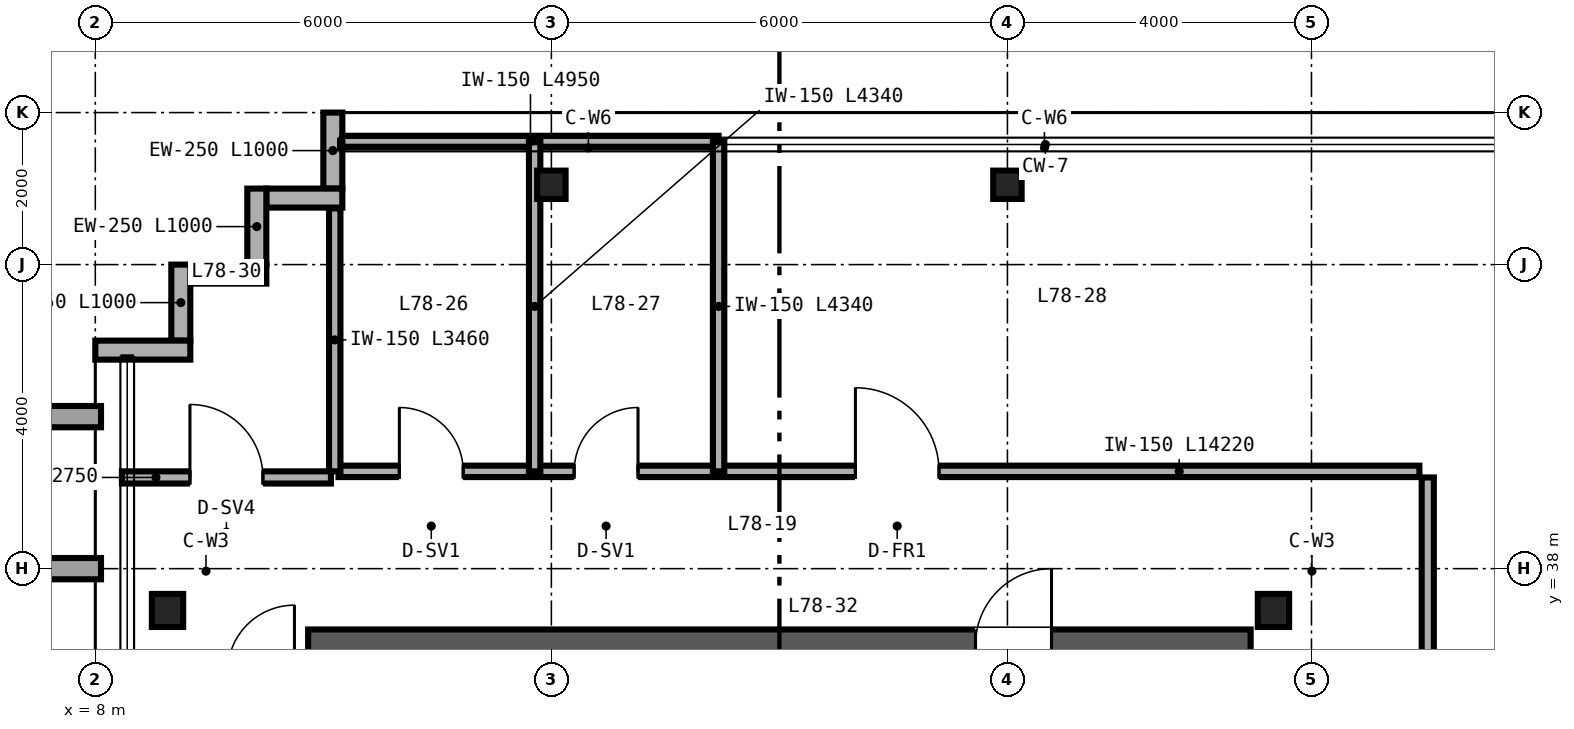
"""IFC4 building model, lengths in metres.
Left out: names, types, materials, properties, quantities, classifications, styles, units other than length and angle.
Written with IfcOpenShell. Run it as: python <this file> out.ifc"""

import sys

from ifc_helpers import new_model, si_unit, direction, frame, frame_2d, origin, origin_2d, place, context, subcontext, project, spatial, rectangle, i_section, extrude, source, transform, mapped, element, fill, save


model = new_model("IFC4")
c1 = context("Model", 3, precision=1e-05, world=origin(), true_north=direction((0.0, 1.0)))
c2 = subcontext(c1, "Body", "Model", "MODEL_VIEW")
j1 = project(units=[si_unit("LENGTHUNIT", "METRE"), si_unit("PLANEANGLEUNIT", "RADIAN")], contexts=[c1])
p1 = place(None, origin())
s1 = spatial("IfcSite", under=j1, at=p1, CompositionType="ELEMENT")
p2 = place(p1, origin())
s2 = spatial("IfcBuilding", under=s1, at=p2, CompositionType="ELEMENT")
p3 = place(p2, frame((0.0, 0.0, 305.4)))
s3 = spatial("IfcBuildingStorey", under=s2, at=p3, CompositionType="ELEMENT", Elevation=305.4)
p4 = place(p3, frame((10.8, 37.0, 0.0), z_axis=(0.0, 0.0, 1.0), x_axis=(1.0, 0.0, 0.0)))
e1 = element("IfcWall", 1, at=p4, inside=s3, PredefinedType="SHEAR", context=c2, shape_type="SweptSolid", body=[
    extrude(rectangle(XDim=12.4, YDim=0.4, at=frame_2d((6.2, 0.0))), origin(), (0.0, 0.0, 1.0), 3.88),
])
p5 = place(p4, frame((8.78, 0.0, 0.0)))
e2 = element("IfcOpeningElement", 2, at=p5, cuts=e1, PredefinedType="OPENING", context=c2, shape_type="SweptSolid", body=[
    extrude(rectangle(XDim=1.0, YDim=2.15, at=frame_2d((0.5, 1.075))), frame((0.0, 0.21, 0.0), z_axis=(0.0, -1.0, 0.0), x_axis=(1.0, 0.0, 0.0)), (0.0, 0.0, 1.0), 0.42),
])
m1 = source(origin(), c2, "Body", "SweptSolid", [
    extrude(i_section(OverallWidth=0.412, OverallDepth=0.435, WebThickness=0.036, FlangeThickness=0.057, FilletRadius=0.025, at=origin_2d()), origin(), (0.0, 0.0, 1.0), 3.88),
])
for number, where, z_axis, x_axis in (
    (3, (8.95, 37.45, 0.0), (0.0, 0.0, 1.0), (1.0, 0.0, 0.0)),
    (4, (23.5, 37.45, 0.0), (0.0, 0.0, 1.0), (1.0, 0.0, 0.0)),
):
    element("IfcColumn", number, at=place(p3, frame(where, z_axis=z_axis, x_axis=x_axis)), inside=s3, PredefinedType="COLUMN", context=c2, shape_type="MappedRepresentation", body=[
        mapped(m1, transform((0.0, 0.0, 0.0), scale=1.0)),
    ])
m2 = source(origin(), c2, "Body", "SweptSolid", [
    extrude(i_section(OverallWidth=0.374, OverallDepth=0.373, WebThickness=0.016, FlangeThickness=0.026, FilletRadius=0.025, at=origin_2d()), origin(), (0.0, 0.0, 1.0), 3.88),
])
for number, where, z_axis, x_axis in (
    (5, (14.0, 43.05, 0.0), (0.0, 0.0, 1.0), (1.0, 0.0, 0.0)),
    (6, (20.0, 43.05, 0.0), (0.0, 0.0, 1.0), (1.0, 0.0, 0.0)),
):
    element("IfcColumn", number, at=place(p3, frame(where, z_axis=z_axis, x_axis=x_axis)), inside=s3, PredefinedType="COLUMN", context=c2, shape_type="MappedRepresentation", body=[
        mapped(m2, transform((0.0, 0.0, 0.0), scale=1.0)),
    ])
for number, where, z_axis, x_axis in (
    (7, (11.125, 44.0, 0.0), (0.0, 0.0, 1.0), (0.0, -1.0, 0.0)),
    (8, (11.25, 42.875, 0.0), (0.0, 0.0, 1.0), (-1.0, 0.0, 0.0)),
    (9, (10.125, 43.0, 0.0), (0.0, 0.0, 1.0), (0.0, -1.0, 0.0)),
    (10, (10.25, 41.875, 0.0), (0.0, 0.0, 1.0), (-1.0, 0.0, 0.0)),
    (11, (9.125, 42.0, 0.0), (0.0, 0.0, 1.0), (0.0, -1.0, 0.0)),
):
    element("IfcWall", number, at=place(p3, frame(where, z_axis=z_axis, x_axis=x_axis)), inside=s3, PredefinedType="SOLIDWALL", context=c2, shape_type="SweptSolid", body=[
        extrude(rectangle(XDim=1.0, YDim=0.25, at=frame_2d((0.5, 0.0))), origin(), (0.0, 0.0, 1.0), 3.88),
    ])
p6 = place(p3, frame((9.25, 40.875, 0.0), z_axis=(0.0, 0.0, 1.0), x_axis=(-1.0, 0.0, 0.0)))
e12 = element("IfcWall", 12, at=p6, inside=s3, PredefinedType="SOLIDWALL", context=c2, shape_type="SweptSolid", body=[
    extrude(rectangle(XDim=1.25, YDim=0.25, at=frame_2d((0.625, 0.0))), origin(), (0.0, 0.0, 1.0), 3.88),
])
p7 = place(p3, frame((25.53, 12.8, 0.0), z_axis=(0.0, 0.0, 1.0), x_axis=(0.0, 1.0, 0.0)))
e13 = element("IfcWall", 13, at=p7, inside=s3, PredefinedType="PARTITIONING", context=c2, shape_type="SweptSolid", body=[
    extrude(rectangle(XDim=26.4, YDim=0.16, at=frame_2d((13.2, 0.0))), origin(), (0.0, 0.0, 1.0), 3.024),
])
p8 = place(p7, frame((5.5, 0.0, 0.0)))
e14 = element("IfcOpeningElement", 14, at=p8, cuts=e13, PredefinedType="OPENING", context=c2, shape_type="SweptSolid", body=[
    extrude(rectangle(XDim=1.6, YDim=2.3, at=frame_2d((0.8, 1.15))), frame((0.0, 0.09, 0.0), z_axis=(0.0, -1.0, 0.0), x_axis=(1.0, 0.0, 0.0)), (0.0, 0.0, 1.0), 0.18),
])
p9 = place(p7, frame((18.5, 0.0, 0.0)))
e15 = element("IfcOpeningElement", 15, at=p9, cuts=e13, PredefinedType="OPENING", context=c2, shape_type="SweptSolid", body=[
    extrude(rectangle(XDim=1.6, YDim=2.3, at=frame_2d((0.8, 1.15))), frame((0.0, 0.09, 0.0), z_axis=(0.0, -1.0, 0.0), x_axis=(1.0, 0.0, 0.0)), (0.0, 0.0, 1.0), 0.18),
])
p10 = place(p3, frame((11.2, 39.28, 0.0), z_axis=(0.0, 0.0, 1.0), x_axis=(1.0, 0.0, 0.0)))
e16 = element("IfcWall", 16, at=p10, inside=s3, PredefinedType="PARTITIONING", context=c2, shape_type="SweptSolid", body=[
    extrude(rectangle(XDim=14.22, YDim=0.15, at=frame_2d((7.11, 0.0))), origin(), (0.0, 0.0, 1.0), 3.88),
])
p11 = place(p10, frame((0.8, 0.0, 0.0)))
e17 = element("IfcOpeningElement", 17, at=p11, cuts=e16, PredefinedType="OPENING", context=c2, shape_type="SweptSolid", body=[
    extrude(rectangle(XDim=0.84, YDim=2.1, at=frame_2d((0.42, 1.05))), frame((0.0, 0.085, 0.0), z_axis=(0.0, -1.0, 0.0), x_axis=(1.0, 0.0, 0.0)), (0.0, 0.0, 1.0), 0.17),
])
p12 = place(p10, frame((3.1, 0.0, 0.0)))
e18 = element("IfcOpeningElement", 18, at=p12, cuts=e16, PredefinedType="OPENING", context=c2, shape_type="SweptSolid", body=[
    extrude(rectangle(XDim=0.84, YDim=2.1, at=frame_2d((0.42, 1.05))), frame((0.0, 0.085, 0.0), z_axis=(0.0, -1.0, 0.0), x_axis=(1.0, 0.0, 0.0)), (0.0, 0.0, 1.0), 0.17),
])
p13 = place(p10, frame((6.8, 0.0, 0.0)))
e19 = element("IfcOpeningElement", 19, at=p13, cuts=e16, PredefinedType="OPENING", context=c2, shape_type="SweptSolid", body=[
    extrude(rectangle(XDim=1.1, YDim=2.15, at=frame_2d((0.55, 1.075))), frame((0.0, 0.085, 0.0), z_axis=(0.0, -1.0, 0.0), x_axis=(1.0, 0.0, 0.0)), (0.0, 0.0, 1.0), 0.17),
])
p14 = place(p3, frame((11.15, 39.28, 0.0), z_axis=(0.0, 0.0, 1.0), x_axis=(0.0, 1.0, 0.0)))
e20 = element("IfcWall", 20, at=p14, inside=s3, PredefinedType="PARTITIONING", context=c2, shape_type="SweptSolid", body=[
    extrude(rectangle(XDim=3.46, YDim=0.15, at=frame_2d((1.73, 0.0))), origin(), (0.0, 0.0, 1.0), 3.88),
])
p15 = place(p3, frame((11.25, 43.62, 0.0), z_axis=(0.0, 0.0, 1.0), x_axis=(1.0, 0.0, 0.0)))
e21 = element("IfcWall", 21, at=p15, inside=s3, PredefinedType="PARTITIONING", context=c2, shape_type="SweptSolid", body=[
    extrude(rectangle(XDim=4.95, YDim=0.15, at=frame_2d((2.475, 0.0))), origin(), (0.0, 0.0, 1.0), 3.88),
])
for number, where, z_axis, x_axis in (
    (22, (13.78, 39.28, 0.0), (0.0, 0.0, 1.0), (0.0, 1.0, 0.0)),
    (23, (16.2, 39.28, 0.0), (0.0, 0.0, 1.0), (0.0, 1.0, 0.0)),
):
    element("IfcWall", number, at=place(p3, frame(where, z_axis=z_axis, x_axis=x_axis)), inside=s3, PredefinedType="PARTITIONING", context=c2, shape_type="SweptSolid", body=[
        extrude(rectangle(XDim=4.34, YDim=0.15, at=frame_2d((2.17, 0.0))), origin(), (0.0, 0.0, 1.0), 3.187),
    ])
p16 = place(p3, frame((8.35, 39.2, 0.0), z_axis=(0.0, 0.0, 1.0), x_axis=(1.0, 0.0, 0.0)))
e24 = element("IfcWall", 24, at=p16, inside=s3, PredefinedType="PARTITIONING", context=c2, shape_type="SweptSolid", body=[
    extrude(rectangle(XDim=2.75, YDim=0.16, at=frame_2d((1.375, 0.0))), origin(), (0.0, 0.0, 1.0), 3.88),
])
p17 = place(p16, frame((0.895, 0.0, 0.0)))
e25 = element("IfcOpeningElement", 25, at=p17, cuts=e24, PredefinedType="OPENING", context=c2, shape_type="SweptSolid", body=[
    extrude(rectangle(XDim=0.96, YDim=2.15, at=frame_2d((0.48, 1.075))), frame((0.0, 0.09, 0.0), z_axis=(0.0, -1.0, 0.0), x_axis=(1.0, 0.0, 0.0)), (0.0, 0.0, 1.0), 0.18),
])
m3 = source(origin(), c2, "Body", "SweptSolid", [
    extrude(rectangle(XDim=1.0, YDim=2.15, at=frame_2d((0.5, 1.075))), frame((0.0, 0.025, 0.0), z_axis=(0.0, -1.0, 0.0), x_axis=(1.0, 0.0, 0.0)), (0.0, 0.0, 1.0), 0.05),
])
p18 = place(p5, origin())
e26 = element("IfcDoor", 26, at=p18, inside=s3, OperationType="SINGLE_SWING_RIGHT", PredefinedType="DOOR", context=c2, shape_type="MappedRepresentation", body=[
    mapped(m3, transform((0.0, 0.0, 0.0), scale=1.0)),
])
fill(e2, e26)
m4 = source(origin(), c2, "Body", "SweptSolid", [
    extrude(rectangle(XDim=0.84, YDim=2.1, at=frame_2d((0.42, 1.05))), frame((0.0, 0.025, 0.0), z_axis=(0.0, -1.0, 0.0), x_axis=(1.0, 0.0, 0.0)), (0.0, 0.0, 1.0), 0.05),
])
p19 = place(p11, origin())
e27 = element("IfcDoor", 27, at=p19, inside=s3, OperationType="SINGLE_SWING_LEFT", PredefinedType="DOOR", context=c2, shape_type="MappedRepresentation", body=[
    mapped(m4, transform((0.0, 0.0, 0.0), scale=1.0)),
])
fill(e17, e27)
p20 = place(p12, origin())
e28 = element("IfcDoor", 28, at=p20, inside=s3, OperationType="SINGLE_SWING_RIGHT", PredefinedType="DOOR", context=c2, shape_type="MappedRepresentation", body=[
    mapped(m4, transform((0.0, 0.0, 0.0), scale=1.0)),
])
fill(e18, e28)
m5 = source(origin(), c2, "Body", "SweptSolid", [
    extrude(rectangle(XDim=1.1, YDim=2.15, at=frame_2d((0.55, 1.075))), frame((0.0, 0.025, 0.0), z_axis=(0.0, -1.0, 0.0), x_axis=(1.0, 0.0, 0.0)), (0.0, 0.0, 1.0), 0.05),
])
p21 = place(p13, origin())
e29 = element("IfcDoor", 29, at=p21, inside=s3, OperationType="SINGLE_SWING_LEFT", PredefinedType="DOOR", context=c2, shape_type="MappedRepresentation", body=[
    mapped(m5, transform((0.0, 0.0, 0.0), scale=1.0)),
])
fill(e19, e29)
m6 = source(origin(), c2, "Body", "SweptSolid", [
    extrude(rectangle(XDim=0.96, YDim=2.15, at=frame_2d((0.48, 1.075))), frame((0.0, 0.025, 0.0), z_axis=(0.0, -1.0, 0.0), x_axis=(1.0, 0.0, 0.0)), (0.0, 0.0, 1.0), 0.05),
])
p22 = place(p17, origin())
e30 = element("IfcDoor", 30, at=p22, inside=s3, OperationType="SINGLE_SWING_LEFT", PredefinedType="DOOR", context=c2, shape_type="MappedRepresentation", body=[
    mapped(m6, transform((0.0, 0.0, 0.0), scale=1.0)),
])
fill(e25, e30)
save(model, sys.argv[1])
